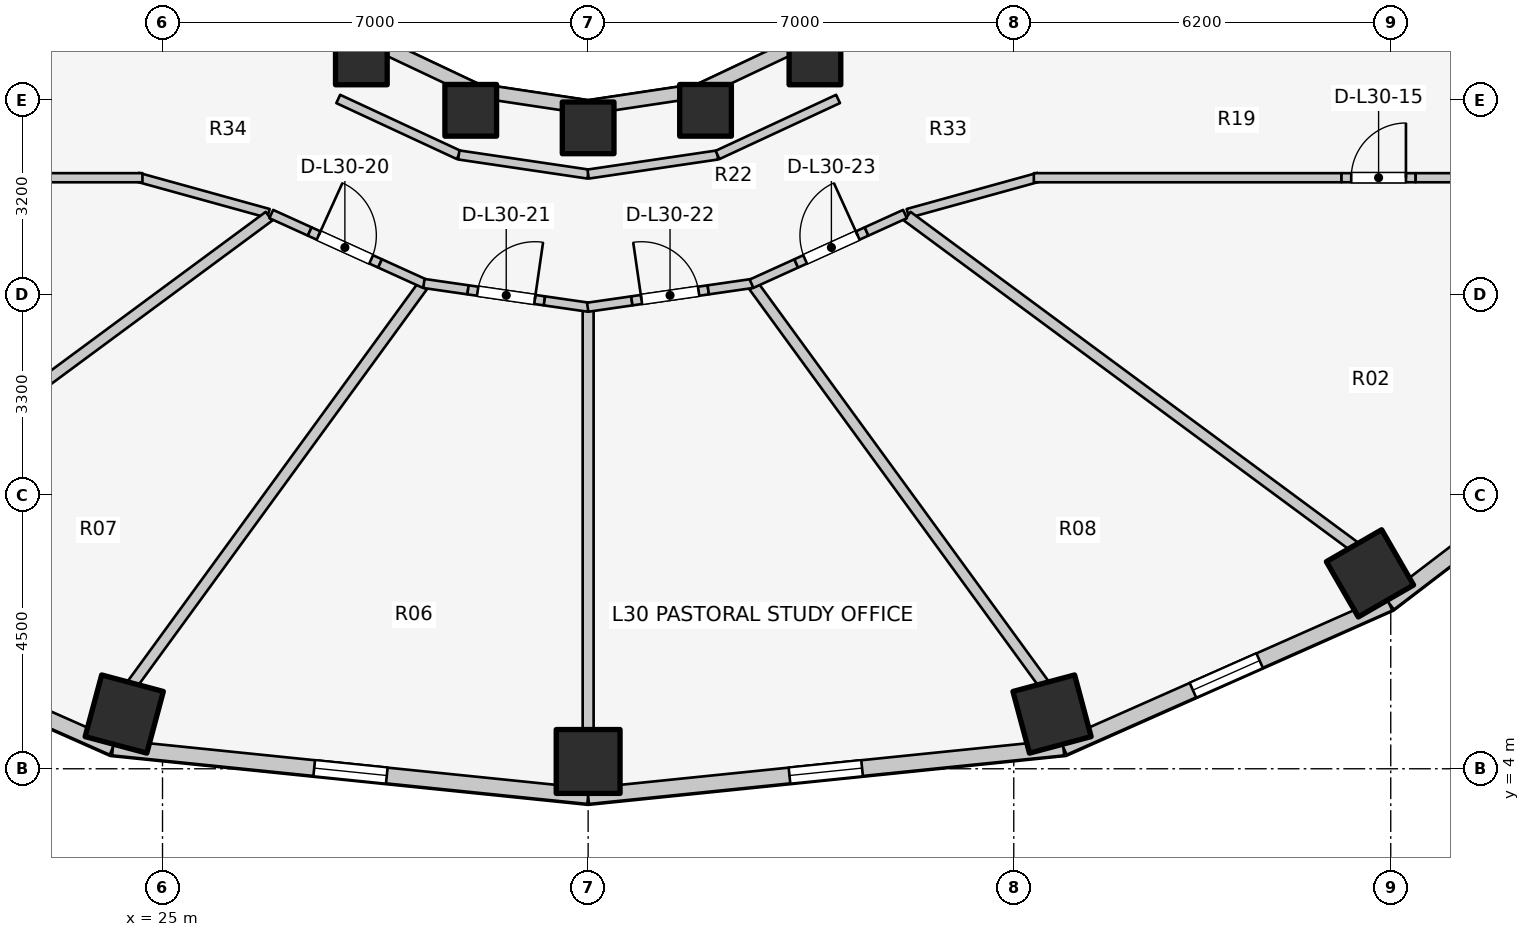
"""IFC4 building model, lengths in metres.
Left out: names, types, materials, properties, quantities, classifications, styles, units other than length and angle.
Written with IfcOpenShell. Run it as: python <this file> out.ifc"""

import sys

from ifc_helpers import new_model, si_unit, direction, frame, frame_2d, origin, origin_2d, place, context, subcontext, project, spatial, rectangle, extrude, element, fill, save


model = new_model("IFC4")
c1 = context("Model", 3, precision=1e-05, world=origin(), true_north=direction((0.0, 1.0)))
c2 = subcontext(c1, "Body", "Model", "MODEL_VIEW")
j1 = project(units=[si_unit("LENGTHUNIT", "METRE"), si_unit("PLANEANGLEUNIT", "RADIAN")], contexts=[c1])
p1 = place(None, origin())
s1 = spatial("IfcSite", under=j1, at=p1, CompositionType="ELEMENT")
p2 = place(p1, origin())
s2 = spatial("IfcBuilding", under=s1, at=p2, CompositionType="ELEMENT")
p3 = place(p2, frame((0.0, 0.0, 101.1)))
s3 = spatial("IfcBuildingStorey", under=s2, at=p3, CompositionType="ELEMENT", Elevation=101.1)
for number, where, z_axis, x_axis in (
    (1, (28.27, 15.673, 0.0), (0.0, 0.0, 1.0), (1.0, 0.0, 0.0)),
    (2, (30.069, 14.828, 0.0), (0.0, 0.0, 1.0), (1.0, 0.0, 0.0)),
):
    element("IfcColumn", number, at=place(p3, frame(where, z_axis=z_axis, x_axis=x_axis)), inside=s3, PredefinedType="COLUMN", context=c2, shape_type="SweptSolid", body=[
        extrude(rectangle(XDim=0.85, YDim=0.85, at=origin_2d()), origin(), (0.0, 0.0, 1.0), 3.1),
    ])
p4 = place(p3, frame((24.371, 4.9, 0.0), z_axis=(0.0, 0.0, 1.0), x_axis=(-0.258819045103, -0.965925826289, 0.0)))
e3 = element("IfcColumn", 3, at=p4, inside=s3, PredefinedType="COLUMN", context=c2, shape_type="SweptSolid", body=[
    extrude(rectangle(XDim=1.05, YDim=1.05, at=origin_2d()), origin(), (0.0, 0.0, 1.0), 3.1),
])
p5 = place(p3, frame((32.0, 14.54, 0.0), z_axis=(0.0, 0.0, 1.0), x_axis=(1.0, 0.0, 0.0)))
e4 = element("IfcColumn", 4, at=p5, inside=s3, PredefinedType="COLUMN", context=c2, shape_type="SweptSolid", body=[
    extrude(rectangle(XDim=0.85, YDim=0.85, at=origin_2d()), origin(), (0.0, 0.0, 1.0), 3.1),
])
p6 = place(p3, frame((32.0, 4.12, 0.0), z_axis=(0.0, 0.0, 1.0), x_axis=(0.0, -1.0, 0.0)))
e5 = element("IfcColumn", 5, at=p6, inside=s3, PredefinedType="COLUMN", context=c2, shape_type="SweptSolid", body=[
    extrude(rectangle(XDim=1.05, YDim=1.05, at=origin_2d()), origin(), (0.0, 0.0, 1.0), 3.1),
])
p7 = place(p3, frame((33.931, 14.828, 0.0), z_axis=(0.0, 0.0, 1.0), x_axis=(1.0, 0.0, 0.0)))
e6 = element("IfcColumn", 6, at=p7, inside=s3, PredefinedType="COLUMN", context=c2, shape_type="SweptSolid", body=[
    extrude(rectangle(XDim=0.85, YDim=0.85, at=origin_2d()), origin(), (0.0, 0.0, 1.0), 3.1),
])
p8 = place(p3, frame((39.629, 4.9, 0.0), z_axis=(0.0, 0.0, 1.0), x_axis=(0.258819045103, -0.965925826289, 0.0)))
e7 = element("IfcColumn", 7, at=p8, inside=s3, PredefinedType="COLUMN", context=c2, shape_type="SweptSolid", body=[
    extrude(rectangle(XDim=1.05, YDim=1.05, at=origin_2d()), origin(), (0.0, 0.0, 1.0), 3.1),
])
p9 = place(p3, frame((35.73, 15.673, 0.0), z_axis=(0.0, 0.0, 1.0), x_axis=(1.0, 0.0, 0.0)))
e8 = element("IfcColumn", 8, at=p9, inside=s3, PredefinedType="COLUMN", context=c2, shape_type="SweptSolid", body=[
    extrude(rectangle(XDim=0.85, YDim=0.85, at=origin_2d()), origin(), (0.0, 0.0, 1.0), 3.1),
])
p10 = place(p3, frame((44.858, 7.214, 0.0), z_axis=(0.0, 0.0, 1.0), x_axis=(0.5, -0.866025403784, 0.0)))
e9 = element("IfcColumn", 9, at=p10, inside=s3, PredefinedType="COLUMN", context=c2, shape_type="SweptSolid", body=[
    extrude(rectangle(XDim=1.05, YDim=1.05, at=origin_2d()), origin(), (0.0, 0.0, 1.0), 3.1),
])
p11 = place(p3, frame((28.44, 15.968, 0.0), z_axis=(0.0, 0.0, 1.0), x_axis=(0.904179699603, -0.427152280606, 0.0)))
e10 = element("IfcWall", 10, at=p11, inside=s3, PredefinedType="STANDARD", context=c2, shape_type="SweptSolid", body=[
    extrude(rectangle(XDim=1.899, YDim=0.23, at=frame_2d((0.95, 0.0))), origin(), (0.0, 0.0, 1.0), 1.22),
])
for number, where, z_axis, x_axis in (
    (11, (30.157, 15.157, 0.0), (0.0, 0.0, 1.0), (0.989, -0.149, 0.0)),
    (12, (32.0, 14.88, 0.0), (0.0, 0.0, 1.0), (0.989, 0.149, 0.0)),
):
    element("IfcWall", number, at=place(p3, frame(where, z_axis=z_axis, x_axis=x_axis)), inside=s3, PredefinedType="STANDARD", context=c2, shape_type="SweptSolid", body=[
        extrude(rectangle(XDim=1.864, YDim=0.23, at=frame_2d((0.932, 0.0))), origin(), (0.0, 0.0, 1.0), 1.22),
    ])
p12 = place(p3, frame((33.843, 15.157, 0.0), z_axis=(0.0, 0.0, 1.0), x_axis=(0.904179699603, 0.427152280606, 0.0)))
e13 = element("IfcWall", 13, at=p12, inside=s3, PredefinedType="STANDARD", context=c2, shape_type="SweptSolid", body=[
    extrude(rectangle(XDim=1.899, YDim=0.23, at=frame_2d((0.95, 0.0))), origin(), (0.0, 0.0, 1.0), 1.22),
])
p13 = place(p3, frame((18.827, 6.722, 0.0), z_axis=(0.0, 0.0, 1.0), x_axis=(0.914336605747, -0.404955023911, 0.0)))
e14 = element("IfcWall", 14, at=p13, inside=s3, PredefinedType="STANDARD", context=c2, shape_type="SweptSolid", body=[
    extrude(rectangle(XDim=5.859, YDim=0.26, at=frame_2d((2.929, 0.0))), origin(), (0.0, 0.0, 1.0), 1.22),
])
p14 = place(p13, frame((2.329, 0.0, 0.15)))
e15 = element("IfcOpeningElement", 15, at=p14, cuts=e14, PredefinedType="OPENING", context=c2, shape_type="SweptSolid", body=[
    extrude(rectangle(XDim=1.2, YDim=0.9, at=frame_2d((0.6, 0.45))), frame((0.0, 0.14, 0.0), z_axis=(0.0, -1.0, 0.0), x_axis=(1.0, 0.0, 0.0)), (0.0, 0.0, 1.0), 0.28),
])
p15 = place(p3, frame((24.184, 4.349, 0.0), z_axis=(0.0, 0.0, 1.0), x_axis=(0.994821390558, -0.101638579726, 0.0)))
e16 = element("IfcWall", 16, at=p15, inside=s3, PredefinedType="STANDARD", context=c2, shape_type="SweptSolid", body=[
    extrude(rectangle(XDim=7.857, YDim=0.26, at=frame_2d((3.929, 0.0))), origin(), (0.0, 0.0, 1.0), 1.22),
])
p16 = place(p15, frame((3.329, 0.0, 0.15)))
e17 = element("IfcOpeningElement", 17, at=p16, cuts=e16, PredefinedType="OPENING", context=c2, shape_type="SweptSolid", body=[
    extrude(rectangle(XDim=1.2, YDim=0.9, at=frame_2d((0.6, 0.45))), frame((0.0, 0.14, 0.0), z_axis=(0.0, -1.0, 0.0), x_axis=(1.0, 0.0, 0.0)), (0.0, 0.0, 1.0), 0.28),
])
p17 = place(p3, frame((32.0, 3.551, 0.0), z_axis=(0.0, 0.0, 1.0), x_axis=(0.994821390558, 0.101638579726, 0.0)))
e18 = element("IfcWall", 18, at=p17, inside=s3, PredefinedType="STANDARD", context=c2, shape_type="SweptSolid", body=[
    extrude(rectangle(XDim=7.857, YDim=0.26, at=frame_2d((3.929, 0.0))), origin(), (0.0, 0.0, 1.0), 1.22),
])
p18 = place(p17, frame((3.329, 0.0, 0.15)))
e19 = element("IfcOpeningElement", 19, at=p18, cuts=e18, PredefinedType="OPENING", context=c2, shape_type="SweptSolid", body=[
    extrude(rectangle(XDim=1.2, YDim=0.9, at=frame_2d((0.6, 0.45))), frame((0.0, 0.14, 0.0), z_axis=(0.0, -1.0, 0.0), x_axis=(1.0, 0.0, 0.0)), (0.0, 0.0, 1.0), 0.28),
])
p19 = place(p3, frame((39.816, 4.349, 0.0), z_axis=(0.0, 0.0, 1.0), x_axis=(0.914336605747, 0.404955023911, 0.0)))
e20 = element("IfcWall", 20, at=p19, inside=s3, PredefinedType="STANDARD", context=c2, shape_type="SweptSolid", body=[
    extrude(rectangle(XDim=5.859, YDim=0.26, at=frame_2d((2.929, 0.0))), origin(), (0.0, 0.0, 1.0), 1.22),
])
p20 = place(p19, frame((2.329, 0.0, 0.15)))
e21 = element("IfcOpeningElement", 21, at=p20, cuts=e20, PredefinedType="OPENING", context=c2, shape_type="SweptSolid", body=[
    extrude(rectangle(XDim=1.2, YDim=0.9, at=frame_2d((0.6, 0.45))), frame((0.0, 0.14, 0.0), z_axis=(0.0, -1.0, 0.0), x_axis=(1.0, 0.0, 0.0)), (0.0, 0.0, 1.0), 0.28),
])
p21 = place(p3, frame((45.173, 6.722, 0.0), z_axis=(0.0, 0.0, 1.0), x_axis=(0.794809810864, 0.606858603427, 0.0)))
e22 = element("IfcWall", 22, at=p21, inside=s3, PredefinedType="STANDARD", context=c2, shape_type="SweptSolid", body=[
    extrude(rectangle(XDim=5.149, YDim=0.26, at=frame_2d((2.575, 0.0))), origin(), (0.0, 0.0, 1.0), 1.22),
])
p22 = place(p3, frame((27.89, 15.015, 0.0), z_axis=(0.0, 0.0, 1.0), x_axis=(0.906943449489, -0.421252393975, 0.0)))
e23 = element("IfcWall", 23, at=p22, inside=s3, PredefinedType="PARTITIONING", context=c2, shape_type="SweptSolid", body=[
    extrude(rectangle(XDim=2.186, YDim=0.15, at=frame_2d((1.093, 0.0))), origin(), (0.0, 0.0, 1.0), 1.992),
])
for number, where, z_axis, x_axis in (
    (24, (29.873, 14.094, 0.0), (0.0, 0.0, 1.0), (0.989, -0.146, 0.0)),
    (25, (32.0, 13.78, 0.0), (0.0, 0.0, 1.0), (0.989, 0.146, 0.0)),
):
    element("IfcWall", number, at=place(p3, frame(where, z_axis=z_axis, x_axis=x_axis)), inside=s3, PredefinedType="PARTITIONING", context=c2, shape_type="SweptSolid", body=[
        extrude(rectangle(XDim=2.151, YDim=0.15, at=frame_2d((1.075, 0.0))), origin(), (0.0, 0.0, 1.0), 1.992),
    ])
p23 = place(p3, frame((34.127, 14.094, 0.0), z_axis=(0.0, 0.0, 1.0), x_axis=(0.906943449489, 0.421252393975, 0.0)))
e26 = element("IfcWall", 26, at=p23, inside=s3, PredefinedType="PARTITIONING", context=c2, shape_type="SweptSolid", body=[
    extrude(rectangle(XDim=2.186, YDim=0.15, at=frame_2d((1.093, 0.0))), origin(), (0.0, 0.0, 1.0), 1.992),
])
p24 = place(p3, frame((26.742, 13.133, 0.0), z_axis=(0.0, 0.0, 1.0), x_axis=(-0.963833843713, 0.266503886865, 0.0)))
e27 = element("IfcWall", 27, at=p24, inside=s3, PredefinedType="PARTITIONING", context=c2, shape_type="SweptSolid", body=[
    extrude(rectangle(XDim=2.232, YDim=0.15, at=frame_2d((1.116, 0.0))), origin(), (0.0, 0.0, 1.0), 1.992),
])
p25 = place(p3, frame((19.51, 13.72, 0.0), z_axis=(0.0, 0.0, 1.0), x_axis=(1.0, 0.0, 0.0)))
e28 = element("IfcWall", 28, at=p25, inside=s3, PredefinedType="PARTITIONING", context=c2, shape_type="SweptSolid", body=[
    extrude(rectangle(XDim=5.16, YDim=0.15, at=frame_2d((2.58, 0.0))), origin(), (0.0, 0.0, 1.0), 1.992),
])
p26 = place(p3, frame((37.258, 13.133, 0.0), z_axis=(0.0, 0.0, 1.0), x_axis=(0.963833843713, 0.266503886865, 0.0)))
e29 = element("IfcWall", 29, at=p26, inside=s3, PredefinedType="PARTITIONING", context=c2, shape_type="SweptSolid", body=[
    extrude(rectangle(XDim=2.232, YDim=0.15, at=frame_2d((1.116, 0.0))), origin(), (0.0, 0.0, 1.0), 1.992),
])
p27 = place(p3, frame((39.33, 13.72, 0.0), z_axis=(0.0, 0.0, 1.0), x_axis=(1.0, 0.0, 0.0)))
e30 = element("IfcWall", 30, at=p27, inside=s3, PredefinedType="PARTITIONING", context=c2, shape_type="SweptSolid", body=[
    extrude(rectangle(XDim=5.06, YDim=0.15, at=frame_2d((2.53, 0.0))), origin(), (0.0, 0.0, 1.0), 1.992),
])
p28 = place(p3, frame((44.39, 13.72, 0.0), z_axis=(0.0, 0.0, 1.0), x_axis=(1.0, 0.0, 0.0)))
e31 = element("IfcWall", 31, at=p28, inside=s3, PredefinedType="PARTITIONING", context=c2, shape_type="SweptSolid", body=[
    extrude(rectangle(XDim=1.22, YDim=0.15, at=frame_2d((0.61, 0.0))), origin(), (0.0, 0.0, 1.0), 2.575),
])
p29 = place(p28, frame((0.16, 0.0, 0.0)))
e32 = element("IfcOpeningElement", 32, at=p29, cuts=e31, PredefinedType="OPENING", context=c2, shape_type="SweptSolid", body=[
    extrude(rectangle(XDim=0.9, YDim=2.1, at=frame_2d((0.45, 1.05))), frame((0.0, 0.085, 0.0), z_axis=(0.0, -1.0, 0.0), x_axis=(1.0, 0.0, 0.0)), (0.0, 0.0, 1.0), 0.17),
])
p30 = place(p3, frame((45.61, 13.72, 0.0), z_axis=(0.0, 0.0, 1.0), x_axis=(1.0, 0.0, 0.0)))
e33 = element("IfcWall", 33, at=p30, inside=s3, PredefinedType="PARTITIONING", context=c2, shape_type="SweptSolid", body=[
    extrude(rectangle(XDim=1.24, YDim=0.15, at=frame_2d((0.62, 0.0))), origin(), (0.0, 0.0, 1.0), 2.575),
])
p31 = place(p3, frame((26.751, 13.086, 0.0), z_axis=(0.0, 0.0, 1.0), x_axis=(-0.80430981394, -0.594210167533, 0.0)))
e34 = element("IfcWall", 34, at=p31, inside=s3, PredefinedType="PARTITIONING", context=c2, shape_type="SweptSolid", body=[
    extrude(rectangle(XDim=9.146, YDim=0.18, at=frame_2d((4.573, 0.0))), origin(), (0.0, 0.0, 1.0), 1.22),
])
p32 = place(p3, frame((29.273, 11.934, 0.0), z_axis=(0.0, 0.0, 1.0), x_axis=(-0.589042211476, -0.808102266486, 0.0)))
e35 = element("IfcWall", 35, at=p32, inside=s3, PredefinedType="PARTITIONING", context=c2, shape_type="SweptSolid", body=[
    extrude(rectangle(XDim=8.101, YDim=0.18, at=frame_2d((4.051, 0.0))), origin(), (0.0, 0.0, 1.0), 1.22),
])
p33 = place(p3, frame((32.0, 11.535, 0.0), z_axis=(0.0, 0.0, 1.0), x_axis=(0.0, -1.0, 0.0)))
e36 = element("IfcWall", 36, at=p33, inside=s3, PredefinedType="PARTITIONING", context=c2, shape_type="SweptSolid", body=[
    extrude(rectangle(XDim=6.91, YDim=0.18, at=frame_2d((3.455, 0.0))), origin(), (0.0, 0.0, 1.0), 1.22),
])
p34 = place(p3, frame((34.727, 11.934, 0.0), z_axis=(0.0, 0.0, 1.0), x_axis=(0.589042211476, -0.808102266486, 0.0)))
e37 = element("IfcWall", 37, at=p34, inside=s3, PredefinedType="PARTITIONING", context=c2, shape_type="SweptSolid", body=[
    extrude(rectangle(XDim=8.101, YDim=0.18, at=frame_2d((4.051, 0.0))), origin(), (0.0, 0.0, 1.0), 1.22),
])
p35 = place(p3, frame((37.249, 13.086, 0.0), z_axis=(0.0, 0.0, 1.0), x_axis=(0.80430981394, -0.594210167533, 0.0)))
e38 = element("IfcWall", 38, at=p35, inside=s3, PredefinedType="PARTITIONING", context=c2, shape_type="SweptSolid", body=[
    extrude(rectangle(XDim=9.146, YDim=0.18, at=frame_2d((4.573, 0.0))), origin(), (0.0, 0.0, 1.0), 1.22),
])
p36 = place(p3, frame((26.789, 13.123, 0.0), z_axis=(0.0, 0.0, 1.0), x_axis=(0.910534957096, -0.413432088627, 0.0)))
e39 = element("IfcWall", 39, at=p36, inside=s3, PredefinedType="PARTITIONING", context=c2, shape_type="SweptSolid", body=[
    extrude(rectangle(XDim=0.694, YDim=0.15, at=frame_2d((0.347, 0.0))), origin(), (0.0, 0.0, 1.0), 2.575),
])
p37 = place(p3, frame((27.421, 12.835, 0.0), z_axis=(0.0, 0.0, 1.0), x_axis=(0.910563905594, -0.413368327075, 0.0)))
e40 = element("IfcWall", 40, at=p37, inside=s3, PredefinedType="PARTITIONING", context=c2, shape_type="SweptSolid", body=[
    extrude(rectangle(XDim=1.27, YDim=0.15, at=frame_2d((0.635, 0.0))), origin(), (0.0, 0.0, 1.0), 2.16),
])
p38 = place(p37, frame((0.16, 0.0, 0.0)))
e41 = element("IfcOpeningElement", 41, at=p38, cuts=e40, PredefinedType="OPENING", context=c2, shape_type="SweptSolid", body=[
    extrude(rectangle(XDim=0.95, YDim=2.1, at=frame_2d((0.475, 1.05))), frame((0.0, 0.085, 0.0), z_axis=(0.0, -1.0, 0.0), x_axis=(1.0, 0.0, 0.0)), (0.0, 0.0, 1.0), 0.17),
])
p39 = place(p3, frame((28.577, 12.311, 0.0), z_axis=(0.0, 0.0, 1.0), x_axis=(0.910604459832, -0.413278982932, 0.0)))
e42 = element("IfcWall", 42, at=p39, inside=s3, PredefinedType="PARTITIONING", context=c2, shape_type="SweptSolid", body=[
    extrude(rectangle(XDim=0.808, YDim=0.15, at=frame_2d((0.404, 0.0))), origin(), (0.0, 0.0, 1.0), 1.992),
])
p40 = place(p3, frame((29.299, 11.981, 0.0), z_axis=(0.0, 0.0, 1.0), x_axis=(0.98974875873, -0.142819447526, 0.0)))
e43 = element("IfcWall", 43, at=p40, inside=s3, PredefinedType="PARTITIONING", context=c2, shape_type="SweptSolid", body=[
    extrude(rectangle(XDim=0.733, YDim=0.15, at=frame_2d((0.367, 0.0))), origin(), (0.0, 0.0, 1.0), 2.575),
])
p41 = place(p3, frame((30.024, 11.876, 0.0), z_axis=(0.0, 0.0, 1.0), x_axis=(0.98974859422, -0.142820587591, 0.0)))
e44 = element("IfcWall", 44, at=p41, inside=s3, PredefinedType="PARTITIONING", context=c2, shape_type="SweptSolid", body=[
    extrude(rectangle(XDim=1.27, YDim=0.15, at=frame_2d((0.635, 0.0))), origin(), (0.0, 0.0, 1.0), 2.575),
])
p42 = place(p41, frame((0.16, 0.0, 0.0)))
e45 = element("IfcOpeningElement", 45, at=p42, cuts=e44, PredefinedType="OPENING", context=c2, shape_type="SweptSolid", body=[
    extrude(rectangle(XDim=0.95, YDim=2.1, at=frame_2d((0.475, 1.05))), frame((0.0, 0.085, 0.0), z_axis=(0.0, -1.0, 0.0), x_axis=(1.0, 0.0, 0.0)), (0.0, 0.0, 1.0), 0.17),
])
for number, where, z_axis, x_axis in (
    (46, (31.281, 11.695, 0.0), (0.0, 0.0, 1.0), (0.99, -0.143, 0.0)),
    (47, (31.993, 11.59, 0.0), (0.0, 0.0, 1.0), (0.99, 0.142, 0.0)),
):
    element("IfcWall", number, at=place(p3, frame(where, z_axis=z_axis, x_axis=x_axis)), inside=s3, PredefinedType="PARTITIONING", context=c2, shape_type="SweptSolid", body=[
        extrude(rectangle(XDim=0.733, YDim=0.15, at=frame_2d((0.367, 0.0))), origin(), (0.0, 0.0, 1.0), 1.992),
    ])
p43 = place(p3, frame((32.719, 11.695, 0.0), z_axis=(0.0, 0.0, 1.0), x_axis=(0.989721405299, 0.14300888047, 0.0)))
e48 = element("IfcWall", 48, at=p43, inside=s3, PredefinedType="PARTITIONING", context=c2, shape_type="SweptSolid", body=[
    extrude(rectangle(XDim=1.27, YDim=0.15, at=frame_2d((0.635, 0.0))), origin(), (0.0, 0.0, 1.0), 2.575),
])
p44 = place(p43, frame((0.16, 0.0, 0.0)))
e49 = element("IfcOpeningElement", 49, at=p44, cuts=e48, PredefinedType="OPENING", context=c2, shape_type="SweptSolid", body=[
    extrude(rectangle(XDim=0.95, YDim=2.1, at=frame_2d((0.475, 1.05))), frame((0.0, 0.085, 0.0), z_axis=(0.0, -1.0, 0.0), x_axis=(1.0, 0.0, 0.0)), (0.0, 0.0, 1.0), 0.17),
])
p45 = place(p3, frame((33.976, 11.876, 0.0), z_axis=(0.0, 0.0, 1.0), x_axis=(0.98974875873, 0.142819447526, 0.0)))
e50 = element("IfcWall", 50, at=p45, inside=s3, PredefinedType="PARTITIONING", context=c2, shape_type="SweptSolid", body=[
    extrude(rectangle(XDim=0.733, YDim=0.15, at=frame_2d((0.367, 0.0))), origin(), (0.0, 0.0, 1.0), 2.575),
])
p46 = place(p3, frame((34.687, 11.977, 0.0), z_axis=(0.0, 0.0, 1.0), x_axis=(0.910604459832, 0.413278982932, 0.0)))
e51 = element("IfcWall", 51, at=p46, inside=s3, PredefinedType="PARTITIONING", context=c2, shape_type="SweptSolid", body=[
    extrude(rectangle(XDim=0.808, YDim=0.15, at=frame_2d((0.404, 0.0))), origin(), (0.0, 0.0, 1.0), 1.992),
])
p47 = place(p3, frame((35.423, 12.311, 0.0), z_axis=(0.0, 0.0, 1.0), x_axis=(0.910563905594, 0.413368327075, 0.0)))
e52 = element("IfcWall", 52, at=p47, inside=s3, PredefinedType="PARTITIONING", context=c2, shape_type="SweptSolid", body=[
    extrude(rectangle(XDim=1.27, YDim=0.15, at=frame_2d((0.635, 0.0))), origin(), (0.0, 0.0, 1.0), 2.16),
])
p48 = place(p47, frame((0.16, 0.0, 0.0)))
e53 = element("IfcOpeningElement", 53, at=p48, cuts=e52, PredefinedType="OPENING", context=c2, shape_type="SweptSolid", body=[
    extrude(rectangle(XDim=0.95, YDim=2.1, at=frame_2d((0.475, 1.05))), frame((0.0, 0.085, 0.0), z_axis=(0.0, -1.0, 0.0), x_axis=(1.0, 0.0, 0.0)), (0.0, 0.0, 1.0), 0.17),
])
p49 = place(p3, frame((36.579, 12.835, 0.0), z_axis=(0.0, 0.0, 1.0), x_axis=(0.910534957096, 0.413432088627, 0.0)))
e54 = element("IfcWall", 54, at=p49, inside=s3, PredefinedType="PARTITIONING", context=c2, shape_type="SweptSolid", body=[
    extrude(rectangle(XDim=0.694, YDim=0.15, at=frame_2d((0.347, 0.0))), origin(), (0.0, 0.0, 1.0), 2.575),
])
p50 = place(p16, origin())
e55 = element("IfcWindow", 55, at=p50, inside=s3, PartitioningType="SINGLE_PANEL", PredefinedType="WINDOW", context=c2, shape_type="SweptSolid", body=[
    extrude(rectangle(XDim=1.2, YDim=0.9, at=frame_2d((0.6, 0.45))), frame((0.0, 0.03, 0.0), z_axis=(0.0, -1.0, 0.0), x_axis=(1.0, 0.0, 0.0)), (0.0, 0.0, 1.0), 0.06),
])
fill(e17, e55)
p51 = place(p18, origin())
e56 = element("IfcWindow", 56, at=p51, inside=s3, PartitioningType="SINGLE_PANEL", PredefinedType="WINDOW", context=c2, shape_type="SweptSolid", body=[
    extrude(rectangle(XDim=1.2, YDim=0.9, at=frame_2d((0.6, 0.45))), frame((0.0, 0.03, 0.0), z_axis=(0.0, -1.0, 0.0), x_axis=(1.0, 0.0, 0.0)), (0.0, 0.0, 1.0), 0.06),
])
fill(e19, e56)
p52 = place(p20, origin())
e57 = element("IfcWindow", 57, at=p52, inside=s3, PartitioningType="SINGLE_PANEL", PredefinedType="WINDOW", context=c2, shape_type="SweptSolid", body=[
    extrude(rectangle(XDim=1.2, YDim=0.9, at=frame_2d((0.6, 0.45))), frame((0.0, 0.03, 0.0), z_axis=(0.0, -1.0, 0.0), x_axis=(1.0, 0.0, 0.0)), (0.0, 0.0, 1.0), 0.06),
])
fill(e21, e57)
p53 = place(p29, origin())
e58 = element("IfcDoor", 58, at=p53, inside=s3, OperationType="SINGLE_SWING_RIGHT", PredefinedType="DOOR", context=c2, shape_type="SweptSolid", body=[
    extrude(rectangle(XDim=0.9, YDim=2.1, at=frame_2d((0.45, 1.05))), frame((0.0, 0.025, 0.0), z_axis=(0.0, -1.0, 0.0), x_axis=(1.0, 0.0, 0.0)), (0.0, 0.0, 1.0), 0.05),
])
fill(e32, e58)
p54 = place(p38, origin())
e59 = element("IfcDoor", 59, at=p54, inside=s3, OperationType="SINGLE_SWING_LEFT", PredefinedType="DOOR", context=c2, shape_type="SweptSolid", body=[
    extrude(rectangle(XDim=0.95, YDim=2.1, at=frame_2d((0.475, 1.05))), frame((0.0, 0.025, 0.0), z_axis=(0.0, -1.0, 0.0), x_axis=(1.0, 0.0, 0.0)), (0.0, 0.0, 1.0), 0.05),
])
fill(e41, e59)
p55 = place(p42, origin())
e60 = element("IfcDoor", 60, at=p55, inside=s3, OperationType="SINGLE_SWING_RIGHT", PredefinedType="DOOR", context=c2, shape_type="SweptSolid", body=[
    extrude(rectangle(XDim=0.95, YDim=2.1, at=frame_2d((0.475, 1.05))), frame((0.0, 0.025, 0.0), z_axis=(0.0, -1.0, 0.0), x_axis=(1.0, 0.0, 0.0)), (0.0, 0.0, 1.0), 0.05),
])
fill(e45, e60)
p56 = place(p44, origin())
e61 = element("IfcDoor", 61, at=p56, inside=s3, OperationType="SINGLE_SWING_LEFT", PredefinedType="DOOR", context=c2, shape_type="SweptSolid", body=[
    extrude(rectangle(XDim=0.95, YDim=2.1, at=frame_2d((0.475, 1.05))), frame((0.0, 0.025, 0.0), z_axis=(0.0, -1.0, 0.0), x_axis=(1.0, 0.0, 0.0)), (0.0, 0.0, 1.0), 0.05),
])
fill(e49, e61)
p57 = place(p48, origin())
e62 = element("IfcDoor", 62, at=p57, inside=s3, OperationType="SINGLE_SWING_RIGHT", PredefinedType="DOOR", context=c2, shape_type="SweptSolid", body=[
    extrude(rectangle(XDim=0.95, YDim=2.1, at=frame_2d((0.475, 1.05))), frame((0.0, 0.025, 0.0), z_axis=(0.0, -1.0, 0.0), x_axis=(1.0, 0.0, 0.0)), (0.0, 0.0, 1.0), 0.05),
])
fill(e53, e62)
save(model, sys.argv[1])
